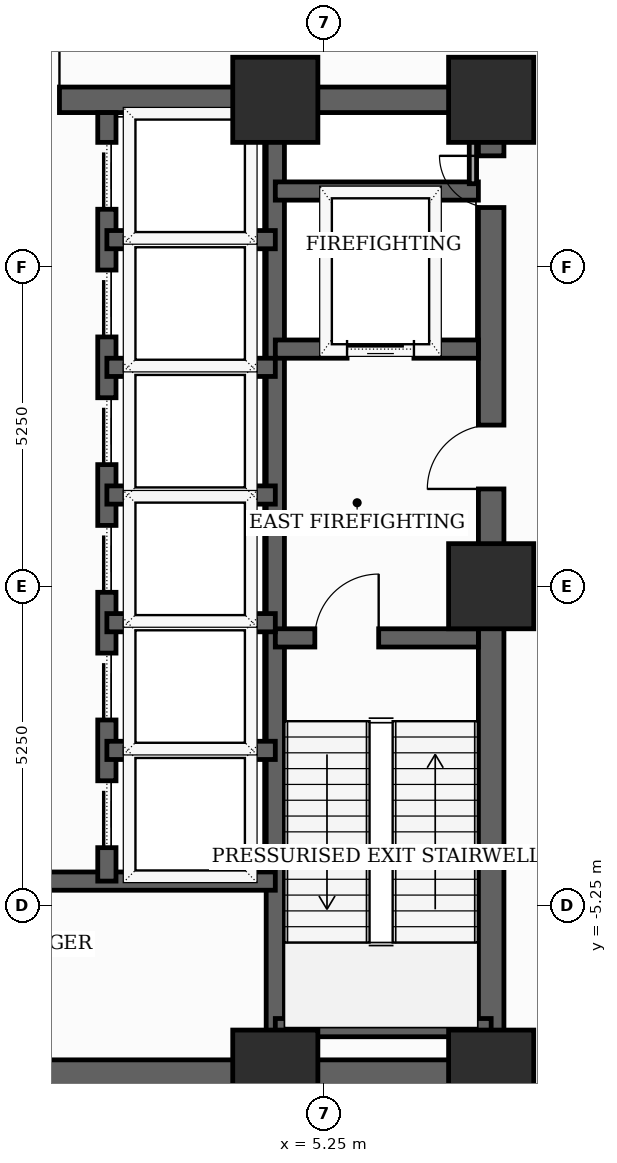
"""IFC4 building model, lengths in metres.
Left out: names, types, materials, properties, quantities, classifications, styles, units other than length and angle.
Written with IfcOpenShell. Run it as: python <this file> out.ifc"""

import sys

from ifc_helpers import new_model, si_unit, direction, frame, frame_2d, origin, origin_2d, place, context, subcontext, project, spatial, rectangle, extrude, element, fill, save


model = new_model("IFC4")
c1 = context("Model", 3, precision=1e-05, world=origin(), true_north=direction((0.0, 1.0)))
c2 = subcontext(c1, "Body", "Model", "MODEL_VIEW")
j1 = project(units=[si_unit("LENGTHUNIT", "METRE"), si_unit("PLANEANGLEUNIT", "RADIAN")], contexts=[c1])
p1 = place(None, origin())
s1 = spatial("IfcSite", under=j1, at=p1, CompositionType="ELEMENT")
p2 = place(p1, origin())
s2 = spatial("IfcBuilding", under=s1, at=p2, CompositionType="ELEMENT")
p3 = place(p2, frame((0.0, 0.0, 85.2)))
s3 = spatial("IfcBuildingStorey", under=s2, at=p3, CompositionType="ELEMENT", Elevation=85.2)
for number, where, z_axis, x_axis in (
    (1, (4.45, -8.0, 0.0), (0.0, 0.0, 1.0), (1.0, 0.0, 0.0)),
    (2, (8.0, -8.0, 0.0), (0.0, 0.0, 1.0), (1.0, 0.0, 0.0)),
    (3, (8.0, 0.0, 0.0), (0.0, 0.0, 1.0), (1.0, 0.0, 0.0)),
    (4, (8.0, 8.0, 0.0), (0.0, 0.0, 1.0), (1.0, 0.0, 0.0)),
    (5, (4.45, 8.0, 0.0), (0.0, 0.0, 1.0), (1.0, 0.0, 0.0)),
):
    element("IfcColumn", number, at=place(p3, frame(where, z_axis=z_axis, x_axis=x_axis)), inside=s3, PredefinedType="COLUMN", context=c2, shape_type="SweptSolid", body=[
        extrude(rectangle(XDim=1.4, YDim=1.4, at=origin_2d()), origin(), (0.0, 0.0, 1.0), 5.1),
    ])
p4 = place(p3, frame((30.436, -3.14, 0.0), z_axis=(0.0, 0.0, 1.0), x_axis=(-0.743144101168, 0.669131410785, 0.0)))
e6 = element("IfcWall", 6, at=p4, inside=s3, PredefinedType="SOLIDWALL", context=c2, shape_type="SweptSolid", body=[
    extrude(rectangle(XDim=49.44, YDim=0.22, at=frame_2d((24.72, 0.0))), origin(), (0.0, 0.0, 1.0), 4.4),
])
p5 = place(p3, frame((8.0, -8.0, 0.0), z_axis=(0.0, 0.0, 1.0), x_axis=(0.0, 1.0, 0.0)))
e7 = element("IfcWall", 7, at=p5, inside=s3, PredefinedType="SHEAR", context=c2, shape_type="SweptSolid", body=[
    extrude(rectangle(XDim=16.0, YDim=0.42, at=frame_2d((8.0, 0.0))), origin(), (0.0, 0.0, 1.0), 4.9),
])
p6 = place(p5, frame((9.6, 0.0, 0.0)))
e8 = element("IfcOpeningElement", 8, at=p6, cuts=e7, PredefinedType="OPENING", context=c2, shape_type="SweptSolid", body=[
    extrude(rectangle(XDim=1.05, YDim=2.15, at=frame_2d((0.525, 1.075))), frame((0.0, 0.22, 0.0), z_axis=(0.0, -1.0, 0.0), x_axis=(1.0, 0.0, 0.0)), (0.0, 0.0, 1.0), 0.44),
])
p7 = place(p5, frame((14.229, 0.0, 0.0)))
e9 = element("IfcOpeningElement", 9, at=p7, cuts=e7, PredefinedType="OPENING", context=c2, shape_type="SweptSolid", body=[
    extrude(rectangle(XDim=0.85, YDim=2.02, at=frame_2d((0.425, 1.01))), frame((0.0, 0.22, 0.0), z_axis=(0.0, -1.0, 0.0), x_axis=(1.0, 0.0, 0.0)), (0.0, 0.0, 1.0), 0.44),
])
p8 = place(p3, frame((-8.0, -8.0, 0.0), z_axis=(0.0, 0.0, 1.0), x_axis=(1.0, 0.0, 0.0)))
e10 = element("IfcWall", 10, at=p8, inside=s3, PredefinedType="SHEAR", context=c2, shape_type="SweptSolid", body=[
    extrude(rectangle(XDim=16.0, YDim=0.42, at=frame_2d((8.0, 0.0))), origin(), (0.0, 0.0, 1.0), 4.9),
])
p9 = place(p8, frame((7.52, 0.0, 0.0)))
e11 = element("IfcOpeningElement", 11, at=p9, cuts=e10, PredefinedType="OPENING", context=c2, shape_type="SweptSolid", body=[
    extrude(rectangle(XDim=0.95, YDim=2.1, at=frame_2d((0.475, 1.05))), frame((0.0, 0.22, 0.0), z_axis=(0.0, -1.0, 0.0), x_axis=(1.0, 0.0, 0.0)), (0.0, 0.0, 1.0), 0.44),
])
p10 = place(p3, frame((-8.0, 8.0, 0.0), z_axis=(0.0, 0.0, 1.0), x_axis=(1.0, 0.0, 0.0)))
e12 = element("IfcWall", 12, at=p10, inside=s3, PredefinedType="SHEAR", context=c2, shape_type="SweptSolid", body=[
    extrude(rectangle(XDim=16.0, YDim=0.42, at=frame_2d((8.0, 0.0))), origin(), (0.0, 0.0, 1.0), 4.9),
])
p11 = place(p10, frame((7.1, 0.0, 0.0)))
e13 = element("IfcOpeningElement", 13, at=p11, cuts=e12, PredefinedType="OPENING", context=c2, shape_type="SweptSolid", body=[
    extrude(rectangle(XDim=1.8, YDim=2.15, at=frame_2d((0.9, 1.075))), frame((0.0, 0.22, 0.0), z_axis=(0.0, -1.0, 0.0), x_axis=(1.0, 0.0, 0.0)), (0.0, 0.0, 1.0), 0.44),
])
p12 = place(p3, frame((4.45, -7.79, 0.0), z_axis=(0.0, 0.0, 1.0), x_axis=(0.0, 1.0, 0.0)))
e14 = element("IfcWall", 14, at=p12, inside=s3, PredefinedType="SHEAR", context=c2, shape_type="SweptSolid", body=[
    extrude(rectangle(XDim=15.58, YDim=0.3, at=frame_2d((7.79, 0.0))), origin(), (0.0, 0.0, 1.0), 4.9),
])
p13 = place(p3, frame((4.45, -0.85, 0.0), z_axis=(0.0, 0.0, 1.0), x_axis=(1.0, 0.0, 0.0)))
e15 = element("IfcWall", 15, at=p13, inside=s3, PredefinedType="SHEAR", context=c2, shape_type="SweptSolid", body=[
    extrude(rectangle(XDim=3.34, YDim=0.3, at=frame_2d((1.67, 0.0))), origin(), (0.0, 0.0, 1.0), 4.9),
])
p14 = place(p13, frame((0.65, 0.0, 0.0)))
e16 = element("IfcOpeningElement", 16, at=p14, cuts=e15, PredefinedType="OPENING", context=c2, shape_type="SweptSolid", body=[
    extrude(rectangle(XDim=1.05, YDim=2.15, at=frame_2d((0.525, 1.075))), frame((0.0, 0.16, 0.0), z_axis=(0.0, -1.0, 0.0), x_axis=(1.0, 0.0, 0.0)), (0.0, 0.0, 1.0), 0.32),
])
p15 = place(p3, frame((4.45, -7.26, 0.0), z_axis=(0.0, 0.0, 1.0), x_axis=(1.0, 0.0, 0.0)))
e17 = element("IfcWall", 17, at=p15, inside=s3, PredefinedType="SHEAR", context=c2, shape_type="SweptSolid", body=[
    extrude(rectangle(XDim=3.55, YDim=0.3, at=frame_2d((1.775, 0.0))), origin(), (0.0, 0.0, 1.0), 4.9),
])
p16 = place(p3, frame((4.45, 3.9, 0.0), z_axis=(0.0, 0.0, 1.0), x_axis=(1.0, 0.0, 0.0)))
e18 = element("IfcWall", 18, at=p16, inside=s3, PredefinedType="SHEAR", context=c2, shape_type="SweptSolid", body=[
    extrude(rectangle(XDim=3.34, YDim=0.3, at=frame_2d((1.67, 0.0))), origin(), (0.0, 0.0, 1.0), 4.9),
])
p17 = place(p16, frame((1.18, 0.0, 0.0)))
e19 = element("IfcOpeningElement", 19, at=p17, cuts=e18, PredefinedType="OPENING", context=c2, shape_type="SweptSolid", body=[
    extrude(rectangle(XDim=1.1, YDim=2.1, at=frame_2d((0.55, 1.05))), frame((0.0, 0.16, 0.0), z_axis=(0.0, -1.0, 0.0), x_axis=(1.0, 0.0, 0.0)), (0.0, 0.0, 1.0), 0.32),
])
p18 = place(p3, frame((4.45, 6.5, 0.0), z_axis=(0.0, 0.0, 1.0), x_axis=(1.0, 0.0, 0.0)))
e20 = element("IfcWall", 20, at=p18, inside=s3, PredefinedType="SHEAR", context=c2, shape_type="SweptSolid", body=[
    extrude(rectangle(XDim=3.34, YDim=0.3, at=frame_2d((1.67, 0.0))), origin(), (0.0, 0.0, 1.0), 4.9),
])
p19 = place(p3, frame((-4.45, -4.85, 0.0), z_axis=(0.0, 0.0, 1.0), x_axis=(1.0, 0.0, 0.0)))
e21 = element("IfcWall", 21, at=p19, inside=s3, PredefinedType="SHEAR", context=c2, shape_type="SweptSolid", body=[
    extrude(rectangle(XDim=8.9, YDim=0.3, at=frame_2d((4.45, 0.0))), origin(), (0.0, 0.0, 1.0), 4.9),
])
p20 = place(p3, frame((1.68, -4.85, 0.0), z_axis=(0.0, 0.0, 1.0), x_axis=(0.0, 1.0, 0.0)))
e22 = element("IfcWall", 22, at=p20, inside=s3, PredefinedType="SHEAR", context=c2, shape_type="SweptSolid", body=[
    extrude(rectangle(XDim=12.64, YDim=0.3, at=frame_2d((6.32, 0.0))), origin(), (0.0, 0.0, 1.0), 4.9),
])
p21 = place(p20, frame((0.55, 0.0, 0.0)))
e23 = element("IfcOpeningElement", 23, at=p21, cuts=e22, PredefinedType="OPENING", context=c2, shape_type="SweptSolid", body=[
    extrude(rectangle(XDim=1.1, YDim=2.1, at=frame_2d((0.55, 1.05))), frame((0.0, 0.16, 0.0), z_axis=(0.0, -1.0, 0.0), x_axis=(1.0, 0.0, 0.0)), (0.0, 0.0, 1.0), 0.32),
])
p22 = place(p20, frame((2.65, 0.0, 0.0)))
e24 = element("IfcOpeningElement", 24, at=p22, cuts=e22, PredefinedType="OPENING", context=c2, shape_type="SweptSolid", body=[
    extrude(rectangle(XDim=1.1, YDim=2.1, at=frame_2d((0.55, 1.05))), frame((0.0, 0.16, 0.0), z_axis=(0.0, -1.0, 0.0), x_axis=(1.0, 0.0, 0.0)), (0.0, 0.0, 1.0), 0.32),
])
p23 = place(p20, frame((4.75, 0.0, 0.0)))
e25 = element("IfcOpeningElement", 25, at=p23, cuts=e22, PredefinedType="OPENING", context=c2, shape_type="SweptSolid", body=[
    extrude(rectangle(XDim=1.1, YDim=2.1, at=frame_2d((0.55, 1.05))), frame((0.0, 0.16, 0.0), z_axis=(0.0, -1.0, 0.0), x_axis=(1.0, 0.0, 0.0)), (0.0, 0.0, 1.0), 0.32),
])
p24 = place(p20, frame((6.85, 0.0, 0.0)))
e26 = element("IfcOpeningElement", 26, at=p24, cuts=e22, PredefinedType="OPENING", context=c2, shape_type="SweptSolid", body=[
    extrude(rectangle(XDim=1.1, YDim=2.1, at=frame_2d((0.55, 1.05))), frame((0.0, 0.16, 0.0), z_axis=(0.0, -1.0, 0.0), x_axis=(1.0, 0.0, 0.0)), (0.0, 0.0, 1.0), 0.32),
])
p25 = place(p20, frame((8.95, 0.0, 0.0)))
e27 = element("IfcOpeningElement", 27, at=p25, cuts=e22, PredefinedType="OPENING", context=c2, shape_type="SweptSolid", body=[
    extrude(rectangle(XDim=1.1, YDim=2.1, at=frame_2d((0.55, 1.05))), frame((0.0, 0.16, 0.0), z_axis=(0.0, -1.0, 0.0), x_axis=(1.0, 0.0, 0.0)), (0.0, 0.0, 1.0), 0.32),
])
p26 = place(p20, frame((11.05, 0.0, 0.0)))
e28 = element("IfcOpeningElement", 28, at=p26, cuts=e22, PredefinedType="OPENING", context=c2, shape_type="SweptSolid", body=[
    extrude(rectangle(XDim=1.1, YDim=2.1, at=frame_2d((0.55, 1.05))), frame((0.0, 0.16, 0.0), z_axis=(0.0, -1.0, 0.0), x_axis=(1.0, 0.0, 0.0)), (0.0, 0.0, 1.0), 0.32),
])
for number, where, z_axis, x_axis in (
    (29, (1.68, 1.5, 0.0), (0.0, 0.0, 1.0), (1.0, 0.0, 0.0)),
    (30, (1.68, 3.6, 0.0), (0.0, 0.0, 1.0), (1.0, 0.0, 0.0)),
    (31, (1.68, 5.7, 0.0), (0.0, 0.0, 1.0), (1.0, 0.0, 0.0)),
    (32, (1.68, -2.7, 0.0), (0.0, 0.0, 1.0), (1.0, 0.0, 0.0)),
    (33, (1.68, -0.6, 0.0), (0.0, 0.0, 1.0), (1.0, 0.0, 0.0)),
):
    element("IfcWall", number, at=place(p3, frame(where, z_axis=z_axis, x_axis=x_axis)), inside=s3, PredefinedType="SHEAR", context=c2, shape_type="SweptSolid", body=[
        extrude(rectangle(XDim=2.77, YDim=0.3, at=frame_2d((1.385, 0.0))), origin(), (0.0, 0.0, 1.0), 4.9),
    ])
p27 = place(p3, frame((-7.036, 28.85, 0.0), z_axis=(0.0, 0.0, 1.0), x_axis=(0.743144937383, -0.669130482075, 0.0)))
e34 = element("IfcWall", 34, at=p27, inside=s3, PredefinedType="SOLIDWALL", context=c2, shape_type="SweptSolid", body=[
    extrude(rectangle(XDim=49.066, YDim=0.16, at=frame_2d((24.533, 0.0))), origin(), (0.0, 0.0, 1.0), 3.485),
])
p28 = place(p3, frame((7.7, 6.62, 0.0), z_axis=(0.0, 0.0, 1.0), x_axis=(0.0, 1.0, 0.0)))
e35 = element("IfcWall", 35, at=p28, inside=s3, PredefinedType="PLUMBINGWALL", context=c2, shape_type="SweptSolid", body=[
    extrude(rectangle(XDim=1.13, YDim=0.12, at=frame_2d((0.565, 0.0))), origin(), (0.0, 0.0, 1.0), 4.9),
])
p29 = place(p6, origin())
e36 = element("IfcDoor", 36, at=p29, inside=s3, OperationType="SINGLE_SWING_LEFT", PredefinedType="DOOR", context=c2, shape_type="SweptSolid", body=[
    extrude(rectangle(XDim=1.05, YDim=2.15, at=frame_2d((0.525, 1.075))), frame((0.0, 0.025, 0.0), z_axis=(0.0, -1.0, 0.0), x_axis=(1.0, 0.0, 0.0)), (0.0, 0.0, 1.0), 0.05),
])
fill(e8, e36)
p30 = place(p7, origin())
e37 = element("IfcDoor", 37, at=p30, inside=s3, OperationType="SINGLE_SWING_RIGHT", PredefinedType="TRAPDOOR", context=c2, shape_type="SweptSolid", body=[
    extrude(rectangle(XDim=0.85, YDim=2.02, at=frame_2d((0.425, 1.01))), frame((0.0, 0.025, 0.0), z_axis=(0.0, -1.0, 0.0), x_axis=(1.0, 0.0, 0.0)), (0.0, 0.0, 1.0), 0.05),
])
fill(e9, e37)
p31 = place(p11, origin())
e38 = element("IfcDoor", 38, at=p31, inside=s3, OperationType="DOUBLE_DOOR_SINGLE_SWING", PredefinedType="DOOR", context=c2, shape_type="SweptSolid", body=[
    extrude(rectangle(XDim=1.8, YDim=2.15, at=frame_2d((0.9, 1.075))), frame((0.0, 0.025, 0.0), z_axis=(0.0, -1.0, 0.0), x_axis=(1.0, 0.0, 0.0)), (0.0, 0.0, 1.0), 0.05),
])
fill(e13, e38)
p32 = place(p14, origin())
e39 = element("IfcDoor", 39, at=p32, inside=s3, OperationType="SINGLE_SWING_RIGHT", PredefinedType="DOOR", context=c2, shape_type="SweptSolid", body=[
    extrude(rectangle(XDim=1.05, YDim=2.15, at=frame_2d((0.525, 1.075))), frame((0.0, 0.025, 0.0), z_axis=(0.0, -1.0, 0.0), x_axis=(1.0, 0.0, 0.0)), (0.0, 0.0, 1.0), 0.05),
])
fill(e16, e39)
p33 = place(p17, origin())
e40 = element("IfcDoor", 40, at=p33, inside=s3, OperationType="SLIDING_TO_LEFT", PredefinedType="DOOR", context=c2, shape_type="SweptSolid", body=[
    extrude(rectangle(XDim=1.1, YDim=2.1, at=frame_2d((0.55, 1.05))), frame((0.0, 0.025, 0.0), z_axis=(0.0, -1.0, 0.0), x_axis=(1.0, 0.0, 0.0)), (0.0, 0.0, 1.0), 0.05),
])
fill(e19, e40)
p34 = place(p21, origin())
e41 = element("IfcDoor", 41, at=p34, inside=s3, OperationType="SLIDING_TO_LEFT", PredefinedType="DOOR", context=c2, shape_type="SweptSolid", body=[
    extrude(rectangle(XDim=1.1, YDim=2.1, at=frame_2d((0.55, 1.05))), frame((0.0, 0.025, 0.0), z_axis=(0.0, -1.0, 0.0), x_axis=(1.0, 0.0, 0.0)), (0.0, 0.0, 1.0), 0.05),
])
fill(e23, e41)
p35 = place(p22, origin())
e42 = element("IfcDoor", 42, at=p35, inside=s3, OperationType="SLIDING_TO_LEFT", PredefinedType="DOOR", context=c2, shape_type="SweptSolid", body=[
    extrude(rectangle(XDim=1.1, YDim=2.1, at=frame_2d((0.55, 1.05))), frame((0.0, 0.025, 0.0), z_axis=(0.0, -1.0, 0.0), x_axis=(1.0, 0.0, 0.0)), (0.0, 0.0, 1.0), 0.05),
])
fill(e24, e42)
p36 = place(p23, origin())
e43 = element("IfcDoor", 43, at=p36, inside=s3, OperationType="SLIDING_TO_LEFT", PredefinedType="DOOR", context=c2, shape_type="SweptSolid", body=[
    extrude(rectangle(XDim=1.1, YDim=2.1, at=frame_2d((0.55, 1.05))), frame((0.0, 0.025, 0.0), z_axis=(0.0, -1.0, 0.0), x_axis=(1.0, 0.0, 0.0)), (0.0, 0.0, 1.0), 0.05),
])
fill(e25, e43)
p37 = place(p24, origin())
e44 = element("IfcDoor", 44, at=p37, inside=s3, OperationType="SLIDING_TO_LEFT", PredefinedType="DOOR", context=c2, shape_type="SweptSolid", body=[
    extrude(rectangle(XDim=1.1, YDim=2.1, at=frame_2d((0.55, 1.05))), frame((0.0, 0.025, 0.0), z_axis=(0.0, -1.0, 0.0), x_axis=(1.0, 0.0, 0.0)), (0.0, 0.0, 1.0), 0.05),
])
fill(e26, e44)
p38 = place(p25, origin())
e45 = element("IfcDoor", 45, at=p38, inside=s3, OperationType="SLIDING_TO_LEFT", PredefinedType="DOOR", context=c2, shape_type="SweptSolid", body=[
    extrude(rectangle(XDim=1.1, YDim=2.1, at=frame_2d((0.55, 1.05))), frame((0.0, 0.025, 0.0), z_axis=(0.0, -1.0, 0.0), x_axis=(1.0, 0.0, 0.0)), (0.0, 0.0, 1.0), 0.05),
])
fill(e27, e45)
p39 = place(p26, origin())
e46 = element("IfcDoor", 46, at=p39, inside=s3, OperationType="SLIDING_TO_LEFT", PredefinedType="DOOR", context=c2, shape_type="SweptSolid", body=[
    extrude(rectangle(XDim=1.1, YDim=2.1, at=frame_2d((0.55, 1.05))), frame((0.0, 0.025, 0.0), z_axis=(0.0, -1.0, 0.0), x_axis=(1.0, 0.0, 0.0)), (0.0, 0.0, 1.0), 0.05),
])
fill(e28, e46)
save(model, sys.argv[1])
